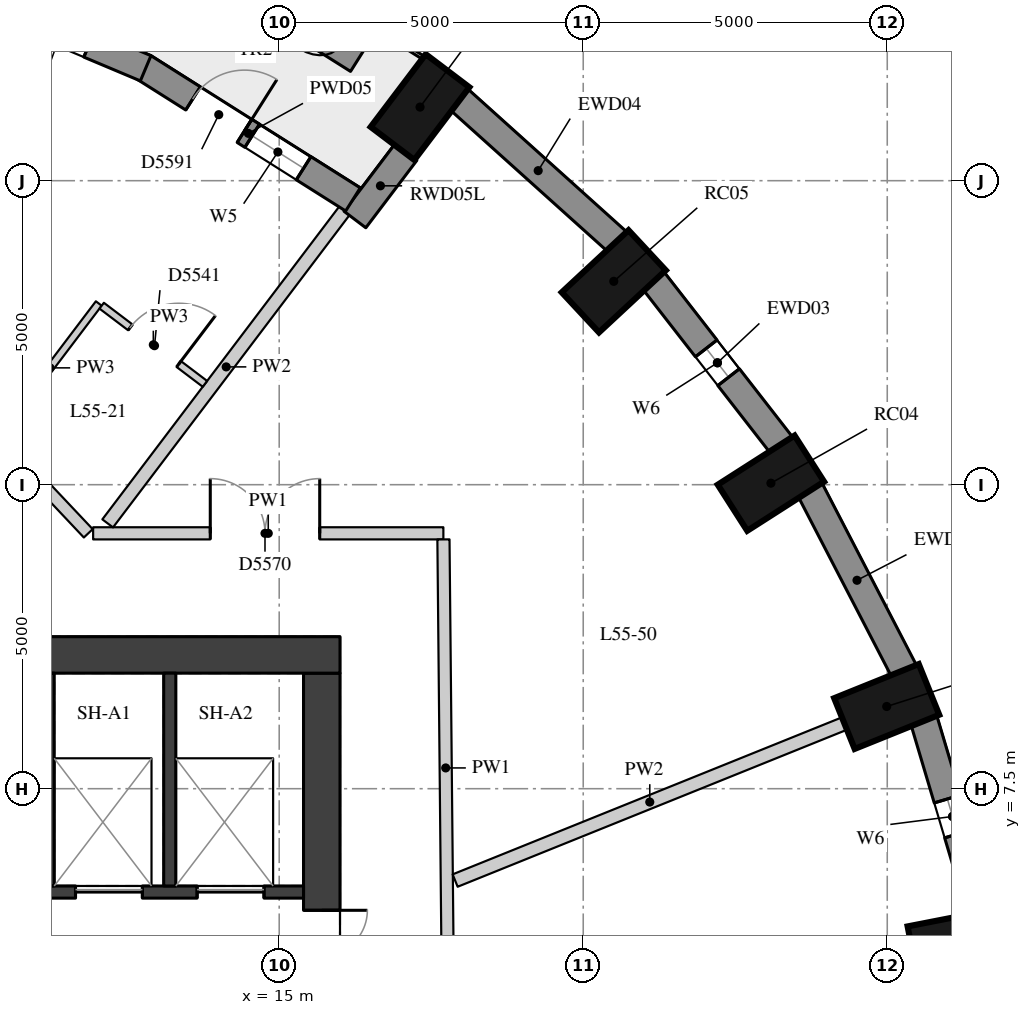
"""IFC4 building model, lengths in metres.
Left out: names, types, materials, properties, quantities, classifications, styles, units other than length and angle.
Written with IfcOpenShell. Run it as: python <this file> out.ifc"""

import sys

from ifc_helpers import new_model, si_unit, direction, frame, frame_2d, origin, origin_2d, place, context, subcontext, project, spatial, rectangle, extrude, element, fill, save


model = new_model("IFC4")
c1 = context("Model", 3, precision=1e-05, world=origin(), true_north=direction((0.0, 1.0)))
c2 = subcontext(c1, "Body", "Model", "MODEL_VIEW")
j1 = project(units=[si_unit("LENGTHUNIT", "METRE"), si_unit("PLANEANGLEUNIT", "RADIAN")], contexts=[c1])
p1 = place(None, origin())
s1 = spatial("IfcSite", under=j1, at=p1, CompositionType="ELEMENT")
p2 = place(p1, origin())
s2 = spatial("IfcBuilding", under=s1, at=p2, CompositionType="ELEMENT")
p3 = place(p2, frame((0.0, 0.0, 195.8)))
s3 = spatial("IfcBuildingStorey", under=s2, at=p3, CompositionType="ELEMENT", Elevation=195.8)
for number, where, z_axis, x_axis in (
    (1, (26.157, 4.937, 0.0), (0.0, 0.0, 1.0), (0.981, 0.192, 0.0)),
    (2, (24.991, 8.852, 0.0), (0.0, 0.0, 1.0), (0.927, 0.374, 0.0)),
    (3, (23.087, 12.525, 0.0), (0.0, 0.0, 1.0), (0.842, 0.539, 0.0)),
    (4, (20.502, 15.845, 0.0), (0.0, 0.0, 1.0), (0.732, 0.681, 0.0)),
    (5, (17.316, 18.71, 0.0), (0.0, 0.0, 1.0), (0.604, 0.797, 0.0)),
):
    element("IfcColumn", number, at=place(p3, frame(where, z_axis=z_axis, x_axis=x_axis)), inside=s3, PredefinedType="COLUMN", context=c2, shape_type="SweptSolid", body=[
        extrude(rectangle(XDim=1.5, YDim=0.9, at=origin_2d()), origin(), (0.0, 0.0, 1.0), 3.3),
    ])
p4 = place(p3, frame((26.548, 5.452, 0.0), z_axis=(0.0, 0.0, 1.0), x_axis=(-0.285444972963, 0.958395099847, 0.0)))
e6 = element("IfcWall", 6, at=p4, inside=s3, PredefinedType="SOLIDWALL", context=c2, shape_type="SweptSolid", body=[
    extrude(rectangle(XDim=3.32, YDim=0.45, at=frame_2d((1.66, 0.0))), origin(), (0.0, 0.0, 1.0), 3.02),
])
p5 = place(p4, frame((1.36, 0.0, 0.4)))
e7 = element("IfcOpeningElement", 7, at=p5, cuts=e6, PredefinedType="OPENING", context=c2, shape_type="SweptSolid", body=[
    extrude(rectangle(XDim=0.6, YDim=1.75, at=frame_2d((0.3, 0.875))), frame((0.0, 0.235, 0.0), z_axis=(0.0, -1.0, 0.0), x_axis=(1.0, 0.0, 0.0)), (0.0, 0.0, 1.0), 0.47),
])
p6 = place(p3, frame((25.278, 9.432, 0.0), z_axis=(0.0, 0.0, 1.0), x_axis=(-0.460175500475, 0.887827972505, 0.0)))
e8 = element("IfcWall", 8, at=p6, inside=s3, PredefinedType="SOLIDWALL", context=c2, shape_type="SweptSolid", body=[
    extrude(rectangle(XDim=3.371, YDim=0.45, at=frame_2d((1.685, 0.0))), origin(), (0.0, 0.0, 1.0), 3.02),
])
p7 = place(p3, frame((23.263, 13.148, 0.0), z_axis=(0.0, 0.0, 1.0), x_axis=(-0.614220816451, 0.789134201919, 0.0)))
e9 = element("IfcWall", 9, at=p7, inside=s3, PredefinedType="SOLIDWALL", context=c2, shape_type="SweptSolid", body=[
    extrude(rectangle(XDim=3.438, YDim=0.45, at=frame_2d((1.719, 0.0))), origin(), (0.0, 0.0, 1.0), 3.02),
])
p8 = place(p7, frame((1.419, 0.0, 0.4)))
e10 = element("IfcOpeningElement", 10, at=p8, cuts=e9, PredefinedType="OPENING", context=c2, shape_type="SweptSolid", body=[
    extrude(rectangle(XDim=0.6, YDim=1.75, at=frame_2d((0.3, 0.875))), frame((0.0, 0.235, 0.0), z_axis=(0.0, -1.0, 0.0), x_axis=(1.0, 0.0, 0.0)), (0.0, 0.0, 1.0), 0.47),
])
p9 = place(p3, frame((20.565, 16.49, 0.0), z_axis=(0.0, 0.0, 1.0), x_axis=(-0.743442727602, 0.668799604348, 0.0)))
e11 = element("IfcWall", 11, at=p9, inside=s3, PredefinedType="SOLIDWALL", context=c2, shape_type="SweptSolid", body=[
    extrude(rectangle(XDim=3.513, YDim=0.45, at=frame_2d((1.756, 0.0))), origin(), (0.0, 0.0, 1.0), 3.02),
])
p10 = place(p3, frame((17.085, 17.97, 0.0), z_axis=(0.0, 0.0, 1.0), x_axis=(-0.603644757989, -0.797253414011, 0.0)))
e12 = element("IfcWall", 12, at=p10, inside=s3, PredefinedType="SOLIDWALL", context=c2, shape_type="SweptSolid", body=[
    extrude(rectangle(XDim=1.391, YDim=0.45, at=frame_2d((0.695, 0.0))), origin(), (0.0, 0.0, 1.0), 3.02),
])
p11 = place(p3, frame((16.213, 17.192, 0.0), z_axis=(0.0, 0.0, 1.0), x_axis=(-0.84545185308, 0.534051649303, 0.0)))
e13 = element("IfcWall", 13, at=p11, inside=s3, PredefinedType="SOLIDWALL", context=c2, shape_type="SweptSolid", body=[
    extrude(rectangle(XDim=4.071, YDim=0.45, at=frame_2d((2.036, 0.0))), origin(), (0.0, 0.0, 1.0), 3.02),
])
p12 = place(p11, frame((0.961, 0.0, 0.4)))
e14 = element("IfcOpeningElement", 14, at=p12, cuts=e13, PredefinedType="OPENING", context=c2, shape_type="SweptSolid", body=[
    extrude(rectangle(XDim=1.0, YDim=1.75, at=frame_2d((0.5, 0.875))), frame((0.0, 0.235, 0.0), z_axis=(0.0, -1.0, 0.0), x_axis=(1.0, 0.0, 0.0)), (0.0, 0.0, 1.0), 0.47),
])
p13 = place(p11, frame((2.111, 0.0, 0.0)))
e15 = element("IfcOpeningElement", 15, at=p13, cuts=e13, PredefinedType="OPENING", context=c2, shape_type="SweptSolid", body=[
    extrude(rectangle(XDim=1.0, YDim=2.15, at=frame_2d((0.5, 1.075))), frame((0.0, 0.235, 0.0), z_axis=(0.0, -1.0, 0.0), x_axis=(1.0, 0.0, 0.0)), (0.0, 0.0, 1.0), 0.47),
])
p14 = place(p3, frame((12.804, 19.349, 0.0), z_axis=(0.0, 0.0, 1.0), x_axis=(-0.921751093055, 0.387782055351, 0.0)))
e16 = element("IfcWall", 16, at=p14, inside=s3, PredefinedType="SOLIDWALL", context=c2, shape_type="SweptSolid", body=[
    extrude(rectangle(XDim=4.168, YDim=0.45, at=frame_2d((2.084, 0.0))), origin(), (0.0, 0.0, 1.0), 3.02),
])
p15 = place(p14, frame((1.009, 0.0, 0.4)))
e17 = element("IfcOpeningElement", 17, at=p15, cuts=e16, PredefinedType="OPENING", context=c2, shape_type="SweptSolid", body=[
    extrude(rectangle(XDim=1.0, YDim=1.75, at=frame_2d((0.5, 0.875))), frame((0.0, 0.235, 0.0), z_axis=(0.0, -1.0, 0.0), x_axis=(1.0, 0.0, 0.0)), (0.0, 0.0, 1.0), 0.47),
])
p16 = place(p14, frame((2.159, 0.0, 0.0)))
e18 = element("IfcOpeningElement", 18, at=p16, cuts=e16, PredefinedType="OPENING", context=c2, shape_type="SweptSolid", body=[
    extrude(rectangle(XDim=1.0, YDim=2.15, at=frame_2d((0.5, 1.075))), frame((0.0, 0.235, 0.0), z_axis=(0.0, -1.0, 0.0), x_axis=(1.0, 0.0, 0.0)), (0.0, 0.0, 1.0), 0.47),
])
p17 = place(p3, frame((16.36, 19.593, 0.0), z_axis=(0.0, 0.0, 1.0), x_axis=(-0.846149017978, 0.532946375703, 0.0)))
e19 = element("IfcWall", 19, at=p17, inside=s3, PredefinedType="USERDEFINED", context=c2, shape_type="SweptSolid", body=[
    extrude(rectangle(XDim=1.8, YDim=0.7, at=frame_2d((0.9, 0.0))), origin(), (0.0, 0.0, 1.0), 0.75),
])
p18 = place(p3, frame((15.7, -9.4, 0.0), z_axis=(0.0, 0.0, 1.0), x_axis=(0.0, 1.0, 0.0)))
e20 = element("IfcWall", 20, at=p18, inside=s3, PredefinedType="SHEAR", context=c2, shape_type="SweptSolid", body=[
    extrude(rectangle(XDim=18.8, YDim=0.6, at=frame_2d((9.4, 0.0))), origin(), (0.0, 0.0, 1.0), 3.02),
])
p19 = place(p18, frame((13.4, 0.0, 0.0)))
e21 = element("IfcOpeningElement", 21, at=p19, cuts=e20, PredefinedType="OPENING", context=c2, shape_type="SweptSolid", body=[
    extrude(rectangle(XDim=1.5, YDim=2.1, at=frame_2d((0.75, 1.05))), frame((0.0, 0.31, 0.0), z_axis=(0.0, -1.0, 0.0), x_axis=(1.0, 0.0, 0.0)), (0.0, 0.0, 1.0), 0.62),
])
p20 = place(p18, frame((3.9, 0.0, 0.0)))
e22 = element("IfcOpeningElement", 22, at=p20, cuts=e20, PredefinedType="OPENING", context=c2, shape_type="SweptSolid", body=[
    extrude(rectangle(XDim=1.5, YDim=2.1, at=frame_2d((0.75, 1.05))), frame((0.0, 0.31, 0.0), z_axis=(0.0, -1.0, 0.0), x_axis=(1.0, 0.0, 0.0)), (0.0, 0.0, 1.0), 0.62),
])
p21 = place(p3, frame((4.0, 9.7, 0.0), z_axis=(0.0, 0.0, 1.0), x_axis=(1.0, 0.0, 0.0)))
e23 = element("IfcWall", 23, at=p21, inside=s3, PredefinedType="SHEAR", context=c2, shape_type="SweptSolid", body=[
    extrude(rectangle(XDim=12.0, YDim=0.6, at=frame_2d((6.0, 0.0))), origin(), (0.0, 0.0, 1.0), 3.02),
])
p22 = place(p3, frame((4.6, 5.8, 0.0), z_axis=(0.0, 0.0, 1.0), x_axis=(1.0, 0.0, 0.0)))
e24 = element("IfcWall", 24, at=p22, inside=s3, PredefinedType="SHEAR", context=c2, shape_type="SweptSolid", body=[
    extrude(rectangle(XDim=10.8, YDim=0.2, at=frame_2d((5.4, 0.0))), origin(), (0.0, 0.0, 1.0), 3.02),
])
p23 = place(p22, frame((7.05, 0.0, 0.0)))
e25 = element("IfcOpeningElement", 25, at=p23, cuts=e24, PredefinedType="OPENING", context=c2, shape_type="SweptSolid", body=[
    extrude(rectangle(XDim=1.1, YDim=2.1, at=frame_2d((0.55, 1.05))), frame((0.0, 0.11, 0.0), z_axis=(0.0, -1.0, 0.0), x_axis=(1.0, 0.0, 0.0)), (0.0, 0.0, 1.0), 0.22),
])
p24 = place(p22, frame((9.05, 0.0, 0.0)))
e26 = element("IfcOpeningElement", 26, at=p24, cuts=e24, PredefinedType="OPENING", context=c2, shape_type="SweptSolid", body=[
    extrude(rectangle(XDim=1.1, YDim=2.1, at=frame_2d((0.55, 1.05))), frame((0.0, 0.11, 0.0), z_axis=(0.0, -1.0, 0.0), x_axis=(1.0, 0.0, 0.0)), (0.0, 0.0, 1.0), 0.22),
])
for number, where, z_axis, x_axis in (
    (27, (11.2, 5.9, 0.0), (0.0, 0.0, 1.0), (0.0, 1.0, 0.0)),
    (28, (13.2, 5.9, 0.0), (0.0, 0.0, 1.0), (0.0, 1.0, 0.0)),
):
    element("IfcWall", number, at=place(p3, frame(where, z_axis=z_axis, x_axis=x_axis)), inside=s3, PredefinedType="SHEAR", context=c2, shape_type="SweptSolid", body=[
        extrude(rectangle(XDim=3.5, YDim=0.2, at=frame_2d((1.75, 0.0))), origin(), (0.0, 0.0, 1.0), 3.02),
    ])
p25 = place(p3, frame((9.916, 13.762, 0.0), z_axis=(0.0, 0.0, 1.0), x_axis=(0.686041532799, -0.727562378958, 0.0)))
e29 = element("IfcWall", 29, at=p25, inside=s3, PredefinedType="PARTITIONING", context=c2, shape_type="SweptSolid", body=[
    extrude(rectangle(XDim=2.834, YDim=0.2, at=frame_2d((1.417, 0.0))), origin(), (0.0, 0.0, 1.0), 3.02),
])
p26 = place(p3, frame((11.94, 11.7, 0.0), z_axis=(0.0, 0.0, 1.0), x_axis=(1.0, 0.0, 0.0)))
e30 = element("IfcWall", 30, at=p26, inside=s3, PredefinedType="PARTITIONING", context=c2, shape_type="SweptSolid", body=[
    extrude(rectangle(XDim=5.76, YDim=0.2, at=frame_2d((2.88, 0.0))), origin(), (0.0, 0.0, 1.0), 3.02),
])
p27 = place(p26, frame((1.927, 0.0, 0.0)))
e31 = element("IfcOpeningElement", 31, at=p27, cuts=e30, PredefinedType="OPENING", context=c2, shape_type="SweptSolid", body=[
    extrude(rectangle(XDim=1.8, YDim=2.1, at=frame_2d((0.9, 1.05))), frame((0.0, 0.11, 0.0), z_axis=(0.0, -1.0, 0.0), x_axis=(1.0, 0.0, 0.0)), (0.0, 0.0, 1.0), 0.22),
])
p28 = place(p3, frame((17.701, 11.6, 0.0), z_axis=(0.0, 0.0, 1.0), x_axis=(0.009840700525, -0.999951579134, 0.0)))
e32 = element("IfcWall", 32, at=p28, inside=s3, PredefinedType="PARTITIONING", context=c2, shape_type="SweptSolid", body=[
    extrude(rectangle(XDim=7.517, YDim=0.2, at=frame_2d((3.759, 0.0))), origin(), (0.0, 0.0, 1.0), 3.02),
])
p29 = place(p3, frame((24.295, 8.571, 0.0), z_axis=(0.0, 0.0, 1.0), x_axis=(-0.927397147779, -0.374078240869, 0.0)))
e33 = element("IfcWall", 33, at=p29, inside=s3, PredefinedType="PARTITIONING", context=c2, shape_type="SweptSolid", body=[
    extrude(rectangle(XDim=6.903, YDim=0.22, at=frame_2d((3.452, 0.0))), origin(), (0.0, 0.0, 1.0), 3.02),
])
p30 = place(p3, frame((16.077, 17.011, 0.0), z_axis=(0.0, 0.0, 1.0), x_axis=(-0.603635635975, -0.797260320712, 0.0)))
e34 = element("IfcWall", 34, at=p30, inside=s3, PredefinedType="PARTITIONING", context=c2, shape_type="SweptSolid", body=[
    extrude(rectangle(XDim=6.457, YDim=0.22, at=frame_2d((3.229, 0.0))), origin(), (0.0, 0.0, 1.0), 3.02),
])
p31 = place(p3, frame((10.43, 13.363, 0.0), z_axis=(0.0, 0.0, 1.0), x_axis=(0.603597479969, 0.797289208616, 0.0)))
e35 = element("IfcWall", 35, at=p31, inside=s3, PredefinedType="PARTITIONING", context=c2, shape_type="SweptSolid", body=[
    extrude(rectangle(XDim=2.656, YDim=0.12, at=frame_2d((1.328, 0.0))), origin(), (0.0, 0.0, 1.0), 3.02),
])
p32 = place(p3, frame((12.081, 15.444, 0.0), z_axis=(0.0, 0.0, 1.0), x_axis=(0.797240905551, -0.603661277967, 0.0)))
e36 = element("IfcWall", 36, at=p32, inside=s3, PredefinedType="PARTITIONING", context=c2, shape_type="SweptSolid", body=[
    extrude(rectangle(XDim=2.13, YDim=0.12, at=frame_2d((1.065, 0.0))), origin(), (0.0, 0.0, 1.0), 3.02),
])
p33 = place(p32, frame((0.59, 0.0, 0.0)))
e37 = element("IfcOpeningElement", 37, at=p33, cuts=e36, PredefinedType="OPENING", context=c2, shape_type="SweptSolid", body=[
    extrude(rectangle(XDim=1.0, YDim=2.1, at=frame_2d((0.5, 1.05))), frame((0.0, 0.07, 0.0), z_axis=(0.0, -1.0, 0.0), x_axis=(1.0, 0.0, 0.0)), (0.0, 0.0, 1.0), 0.14),
])
p34 = place(p5, origin())
e38 = element("IfcWindow", 38, at=p34, inside=s3, PartitioningType="SINGLE_PANEL", PredefinedType="WINDOW", context=c2, shape_type="SweptSolid", body=[
    extrude(rectangle(XDim=0.6, YDim=1.75, at=frame_2d((0.3, 0.875))), frame((0.0, 0.035, 0.0), z_axis=(0.0, -1.0, 0.0), x_axis=(1.0, 0.0, 0.0)), (0.0, 0.0, 1.0), 0.06),
])
fill(e7, e38)
p35 = place(p8, origin())
e39 = element("IfcWindow", 39, at=p35, inside=s3, PartitioningType="SINGLE_PANEL", PredefinedType="WINDOW", context=c2, shape_type="SweptSolid", body=[
    extrude(rectangle(XDim=0.6, YDim=1.75, at=frame_2d((0.3, 0.875))), frame((0.0, 0.035, 0.0), z_axis=(0.0, -1.0, 0.0), x_axis=(1.0, 0.0, 0.0)), (0.0, 0.0, 1.0), 0.06),
])
fill(e10, e39)
p36 = place(p12, origin())
e40 = element("IfcWindow", 40, at=p36, inside=s3, PartitioningType="SINGLE_PANEL", PredefinedType="WINDOW", context=c2, shape_type="SweptSolid", body=[
    extrude(rectangle(XDim=1.0, YDim=1.75, at=frame_2d((0.5, 0.875))), frame((0.0, 0.035, 0.0), z_axis=(0.0, -1.0, 0.0), x_axis=(1.0, 0.0, 0.0)), (0.0, 0.0, 1.0), 0.06),
])
fill(e14, e40)
p37 = place(p13, frame((1.0, 0.0, 0.0), z_axis=(0.0, 0.0, 1.0), x_axis=(-1.0, 0.0, 0.0)))
e41 = element("IfcDoor", 41, at=p37, inside=s3, OperationType="SINGLE_SWING_RIGHT", PredefinedType="DOOR", context=c2, shape_type="SweptSolid", body=[
    extrude(rectangle(XDim=1.0, YDim=2.15, at=frame_2d((0.5, 1.075))), frame((0.0, 0.075, 0.0), z_axis=(0.0, -1.0, 0.0), x_axis=(1.0, 0.0, 0.0)), (0.0, 0.0, 1.0), 0.05),
])
fill(e15, e41)
p38 = place(p19, origin())
e42 = element("IfcDoor", 42, at=p38, inside=s3, OperationType="DOUBLE_DOOR_SINGLE_SWING", PredefinedType="DOOR", context=c2, shape_type="SweptSolid", body=[
    extrude(rectangle(XDim=1.5, YDim=2.1, at=frame_2d((0.75, 1.05))), frame((0.0, 0.025, 0.0), z_axis=(0.0, -1.0, 0.0), x_axis=(1.0, 0.0, 0.0)), (0.0, 0.0, 1.0), 0.05),
])
fill(e21, e42)
p39 = place(p23, origin())
e43 = element("IfcDoor", 43, at=p39, inside=s3, OperationType="DOUBLE_DOOR_SLIDING", PredefinedType="DOOR", context=c2, shape_type="SweptSolid", body=[
    extrude(rectangle(XDim=1.1, YDim=2.1, at=frame_2d((0.55, 1.05))), frame((0.0, 0.025, 0.0), z_axis=(0.0, -1.0, 0.0), x_axis=(1.0, 0.0, 0.0)), (0.0, 0.0, 1.0), 0.05),
])
fill(e25, e43)
p40 = place(p24, origin())
e44 = element("IfcDoor", 44, at=p40, inside=s3, OperationType="DOUBLE_DOOR_SLIDING", PredefinedType="DOOR", context=c2, shape_type="SweptSolid", body=[
    extrude(rectangle(XDim=1.1, YDim=2.1, at=frame_2d((0.55, 1.05))), frame((0.0, 0.025, 0.0), z_axis=(0.0, -1.0, 0.0), x_axis=(1.0, 0.0, 0.0)), (0.0, 0.0, 1.0), 0.05),
])
fill(e26, e44)
p41 = place(p33, origin())
e45 = element("IfcDoor", 45, at=p41, inside=s3, OperationType="SINGLE_SWING_RIGHT", PredefinedType="DOOR", context=c2, shape_type="SweptSolid", body=[
    extrude(rectangle(XDim=1.0, YDim=2.1, at=frame_2d((0.5, 1.05))), frame((0.0, 0.025, 0.0), z_axis=(0.0, -1.0, 0.0), x_axis=(1.0, 0.0, 0.0)), (0.0, 0.0, 1.0), 0.05),
])
fill(e37, e45)
p42 = place(p27, origin())
e46 = element("IfcDoor", 46, at=p42, inside=s3, OperationType="DOUBLE_DOOR_SINGLE_SWING", PredefinedType="DOOR", context=c2, shape_type="SweptSolid", body=[
    extrude(rectangle(XDim=1.8, YDim=2.1, at=frame_2d((0.9, 1.05))), frame((0.0, 0.025, 0.0), z_axis=(0.0, -1.0, 0.0), x_axis=(1.0, 0.0, 0.0)), (0.0, 0.0, 1.0), 0.05),
])
fill(e31, e46)
save(model, sys.argv[1])
